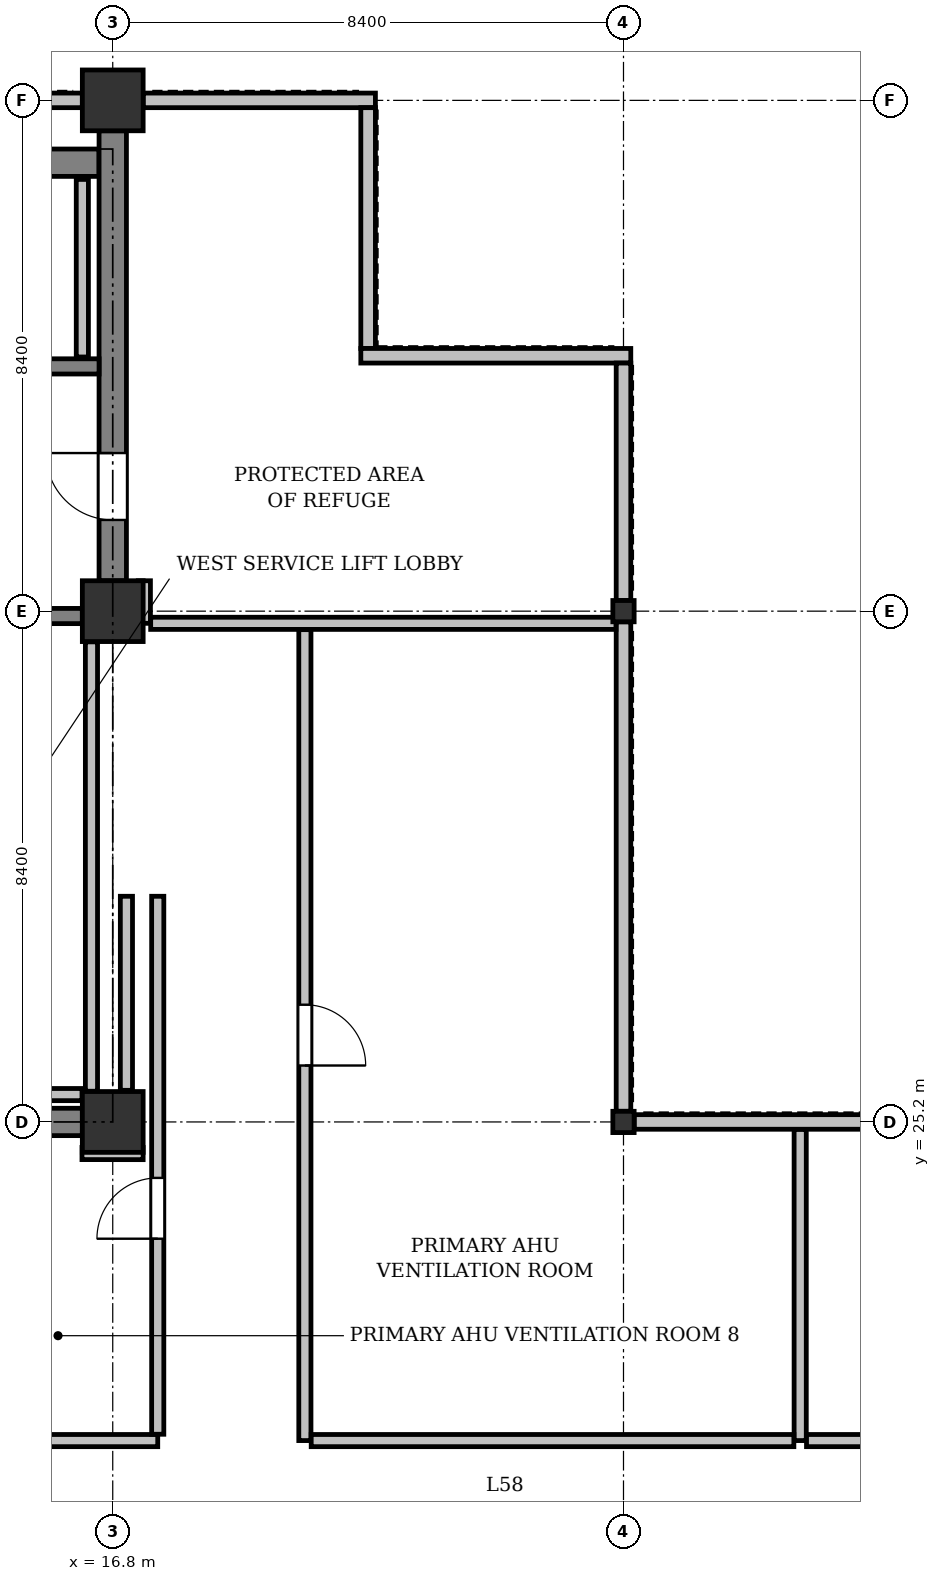
"""IFC4 building model, lengths in metres.
Left out: names, types, materials, properties, quantities, classifications, styles, units other than length and angle.
Written with IfcOpenShell. Run it as: python <this file> out.ifc"""

import sys

from ifc_helpers import new_model, si_unit, direction, frame, frame_2d, origin, origin_2d, place, context, subcontext, project, spatial, rectangle, i_section, extrude, element, fill, save


model = new_model("IFC4")
c1 = context("Model", 3, precision=1e-05, world=origin(), true_north=direction((0.0, 1.0)))
c2 = subcontext(c1, "Body", "Model", "MODEL_VIEW")
j1 = project(units=[si_unit("LENGTHUNIT", "METRE"), si_unit("PLANEANGLEUNIT", "RADIAN")], contexts=[c1])
p1 = place(None, origin())
s1 = spatial("IfcSite", under=j1, at=p1, CompositionType="ELEMENT")
p2 = place(p1, origin())
s2 = spatial("IfcBuilding", under=s1, at=p2, CompositionType="ELEMENT")
p3 = place(p2, frame((0.0, 0.0, 245.2)))
s3 = spatial("IfcBuildingStorey", under=s2, at=p3, CompositionType="ELEMENT", Elevation=245.2)
for number, where, z_axis, x_axis in (
    (1, (16.8, 25.2, 0.0), (0.0, 0.0, 1.0), (1.0, 0.0, 0.0)),
    (2, (16.8, 33.6, 0.0), (0.0, 0.0, 1.0), (1.0, 0.0, 0.0)),
    (3, (16.8, 42.0, 0.0), (0.0, 0.0, 1.0), (1.0, 0.0, 0.0)),
):
    element("IfcColumn", number, at=place(p3, frame(where, z_axis=z_axis, x_axis=x_axis)), inside=s3, PredefinedType="COLUMN", context=c2, shape_type="SweptSolid", body=[
        extrude(rectangle(XDim=1.0, YDim=1.0, at=origin_2d()), origin(), (0.0, 0.0, 1.0), 5.0),
    ])
for number, where, z_axis, x_axis in (
    (4, (25.2, 25.2, 0.0), (0.0, 0.0, 1.0), (1.0, 0.0, 0.0)),
    (5, (25.2, 33.6, 0.0), (0.0, 0.0, 1.0), (1.0, 0.0, 0.0)),
):
    element("IfcColumn", number, at=place(p3, frame(where, z_axis=z_axis, x_axis=x_axis)), inside=s3, PredefinedType="COLUMN", context=c2, shape_type="SweptSolid", body=[
        extrude(i_section(OverallWidth=0.35, OverallDepth=0.35, WebThickness=0.02, FlangeThickness=0.032, at=origin_2d()), origin(), (0.0, 0.0, 1.0), 5.0),
    ])
p4 = place(p3, frame((8.9, 42.0, 0.0), z_axis=(0.0, 0.0, 1.0), x_axis=(1.0, 0.0, 0.0)))
e6 = element("IfcWall", 6, at=p4, inside=s3, PredefinedType="STANDARD", context=c2, shape_type="SweptSolid", body=[
    extrude(rectangle(XDim=7.4, YDim=0.24, at=frame_2d((3.7, 0.0))), origin(), (0.0, 0.0, 1.0), 4.425),
])
p5 = place(p3, frame((17.3, 42.0, 0.0), z_axis=(0.0, 0.0, 1.0), x_axis=(1.0, 0.0, 0.0)))
e7 = element("IfcWall", 7, at=p5, inside=s3, PredefinedType="STANDARD", context=c2, shape_type="SweptSolid", body=[
    extrude(rectangle(XDim=3.82, YDim=0.24, at=frame_2d((1.91, 0.0))), origin(), (0.0, 0.0, 1.0), 4.725),
])
p6 = place(p3, frame((21.0, 41.88, 0.0), z_axis=(0.0, 0.0, 1.0), x_axis=(0.0, -1.0, 0.0)))
e8 = element("IfcWall", 8, at=p6, inside=s3, PredefinedType="STANDARD", context=c2, shape_type="SweptSolid", body=[
    extrude(rectangle(XDim=3.96, YDim=0.24, at=frame_2d((1.98, 0.0))), origin(), (0.0, 0.0, 1.0), 4.725),
])
p7 = place(p3, frame((20.88, 37.8, 0.0), z_axis=(0.0, 0.0, 1.0), x_axis=(1.0, 0.0, 0.0)))
e9 = element("IfcWall", 9, at=p7, inside=s3, PredefinedType="STANDARD", context=c2, shape_type="SweptSolid", body=[
    extrude(rectangle(XDim=4.44, YDim=0.24, at=frame_2d((2.22, 0.0))), origin(), (0.0, 0.0, 1.0), 4.725),
])
p8 = place(p3, frame((25.2, 37.68, 0.0), z_axis=(0.0, 0.0, 1.0), x_axis=(0.0, -1.0, 0.0)))
e10 = element("IfcWall", 10, at=p8, inside=s3, PredefinedType="STANDARD", context=c2, shape_type="SweptSolid", body=[
    extrude(rectangle(XDim=3.905, YDim=0.24, at=frame_2d((1.953, 0.0))), origin(), (0.0, 0.0, 1.0), 4.725),
])
for number, where, z_axis, x_axis in (
    (11, (25.2, 33.425, 0.0), (0.0, 0.0, 1.0), (0.0, -1.0, 0.0)),
    (12, (25.375, 25.2, 0.0), (0.0, 0.0, 1.0), (1.0, 0.0, 0.0)),
):
    element("IfcWall", number, at=place(p3, frame(where, z_axis=z_axis, x_axis=x_axis)), inside=s3, PredefinedType="STANDARD", context=c2, shape_type="SweptSolid", body=[
        extrude(rectangle(XDim=8.05, YDim=0.24, at=frame_2d((4.025, 0.0))), origin(), (0.0, 0.0, 1.0), 4.425),
    ])
p9 = place(p3, frame((8.625, 40.975, 0.0), z_axis=(0.0, 0.0, 1.0), x_axis=(1.0, 0.0, 0.0)))
e13 = element("IfcWall", 13, at=p9, inside=s3, PredefinedType="SHEAR", context=c2, shape_type="SweptSolid", body=[
    extrude(rectangle(XDim=7.95, YDim=0.45, at=frame_2d((3.975, 0.0))), origin(), (0.0, 0.0, 1.0), 4.725),
])
p10 = place(p3, frame((16.8, 34.1, 0.0), z_axis=(0.0, 0.0, 1.0), x_axis=(0.0, 1.0, 0.0)))
e14 = element("IfcWall", 14, at=p10, inside=s3, PredefinedType="SHEAR", context=c2, shape_type="SweptSolid", body=[
    extrude(rectangle(XDim=7.4, YDim=0.45, at=frame_2d((3.7, 0.0))), origin(), (0.0, 0.0, 1.0), 4.725),
])
p11 = place(p10, frame((1.0, 0.0, 0.0)))
e15 = element("IfcOpeningElement", 15, at=p11, cuts=e14, PredefinedType="OPENING", context=c2, shape_type="SweptSolid", body=[
    extrude(rectangle(XDim=1.1, YDim=2.15, at=frame_2d((0.55, 1.075))), frame((0.0, 0.235, 0.0), z_axis=(0.0, -1.0, 0.0), x_axis=(1.0, 0.0, 0.0)), (0.0, 0.0, 1.0), 0.47),
])
p12 = place(p3, frame((8.9, 25.2, 0.0), z_axis=(0.0, 0.0, 1.0), x_axis=(1.0, 0.0, 0.0)))
e16 = element("IfcWall", 16, at=p12, inside=s3, PredefinedType="SHEAR", context=c2, shape_type="SweptSolid", body=[
    extrude(rectangle(XDim=7.4, YDim=0.45, at=frame_2d((3.7, 0.0))), origin(), (0.0, 0.0, 1.0), 4.725),
])
p13 = place(p12, frame((3.8, 0.0, 0.0)))
e17 = element("IfcOpeningElement", 17, at=p13, cuts=e16, PredefinedType="OPENING", context=c2, shape_type="SweptSolid", body=[
    extrude(rectangle(XDim=1.1, YDim=2.15, at=frame_2d((0.55, 1.075))), frame((0.0, 0.235, 0.0), z_axis=(0.0, -1.0, 0.0), x_axis=(1.0, 0.0, 0.0)), (0.0, 0.0, 1.0), 0.47),
])
p14 = place(p3, frame((12.45, 33.52, 0.0), z_axis=(0.0, 0.0, 1.0), x_axis=(1.0, 0.0, 0.0)))
e18 = element("IfcWall", 18, at=p14, inside=s3, PredefinedType="SHEAR", context=c2, shape_type="SweptSolid", body=[
    extrude(rectangle(XDim=3.85, YDim=0.25, at=frame_2d((1.925, 0.0))), origin(), (0.0, 0.0, 1.0), 4.725),
])
p15 = place(p14, frame((0.32, 0.0, 0.0)))
e19 = element("IfcOpeningElement", 19, at=p15, cuts=e18, PredefinedType="OPENING", context=c2, shape_type="SweptSolid", body=[
    extrude(rectangle(XDim=1.0, YDim=2.15, at=frame_2d((0.5, 1.075))), frame((0.0, 0.135, 0.0), z_axis=(0.0, -1.0, 0.0), x_axis=(1.0, 0.0, 0.0)), (0.0, 0.0, 1.0), 0.27),
])
p16 = place(p3, frame((12.45, 37.625, 0.0), z_axis=(0.0, 0.0, 1.0), x_axis=(1.0, 0.0, 0.0)))
e20 = element("IfcWall", 20, at=p16, inside=s3, PredefinedType="SHEAR", context=c2, shape_type="SweptSolid", body=[
    extrude(rectangle(XDim=4.125, YDim=0.25, at=frame_2d((2.062, 0.0))), origin(), (0.0, 0.0, 1.0), 4.725),
])
p17 = place(p16, frame((1.637, 0.0, 0.0)))
e21 = element("IfcOpeningElement", 21, at=p17, cuts=e20, PredefinedType="OPENING", context=c2, shape_type="SweptSolid", body=[
    extrude(rectangle(XDim=0.85, YDim=2.15, at=frame_2d((0.425, 1.075))), frame((0.0, 0.135, 0.0), z_axis=(0.0, -1.0, 0.0), x_axis=(1.0, 0.0, 0.0)), (0.0, 0.0, 1.0), 0.27),
])
p18 = place(p3, frame((16.45, 25.705, 0.0), z_axis=(0.0, 0.0, 1.0), x_axis=(0.0, 1.0, 0.0)))
e22 = element("IfcWall", 22, at=p18, inside=s3, PredefinedType="PARTITIONING", context=c2, shape_type="SweptSolid", body=[
    extrude(rectangle(XDim=7.39, YDim=0.2, at=frame_2d((3.695, 0.0))), origin(), (0.0, 0.0, 1.0), 4.725),
])
p19 = place(p3, frame((14.354, 25.65, 0.0), z_axis=(0.0, 0.0, 1.0), x_axis=(1.0, 0.0, 0.0)))
e23 = element("IfcWall", 23, at=p19, inside=s3, PredefinedType="PARTITIONING", context=c2, shape_type="SweptSolid", body=[
    extrude(rectangle(XDim=1.941, YDim=0.2, at=frame_2d((0.97, 0.0))), origin(), (0.0, 0.0, 1.0), 4.725),
])
p20 = place(p3, frame((16.3, 37.78, 0.0), z_axis=(0.0, 0.0, 1.0), x_axis=(0.0, 1.0, 0.0)))
e24 = element("IfcWall", 24, at=p20, inside=s3, PredefinedType="PARTITIONING", context=c2, shape_type="SweptSolid", body=[
    extrude(rectangle(XDim=2.92, YDim=0.2, at=frame_2d((1.46, 0.0))), origin(), (0.0, 0.0, 1.0), 3.775),
])
p21 = place(p3, frame((17.32, 34.1, 0.0), z_axis=(0.0, 0.0, 1.0), x_axis=(0.0, -1.0, 0.0)))
e25 = element("IfcWall", 25, at=p21, inside=s3, PredefinedType="PARTITIONING", context=c2, shape_type="SweptSolid", body=[
    extrude(rectangle(XDim=0.7, YDim=0.2, at=frame_2d((0.35, 0.0))), origin(), (0.0, 0.0, 1.0), 3.825),
])
p22 = place(p3, frame((17.424, 33.4, 0.0), z_axis=(0.0, 0.0, 1.0), x_axis=(1.0, 0.0, 0.0)))
e26 = element("IfcWall", 26, at=p22, inside=s3, PredefinedType="PARTITIONING", context=c2, shape_type="SweptSolid", body=[
    extrude(rectangle(XDim=7.652, YDim=0.2, at=frame_2d((3.826, 0.0))), origin(), (0.0, 0.0, 1.0), 3.825),
])
p23 = place(p3, frame((28.106, 25.076, 0.0), z_axis=(0.0, 0.0, 1.0), x_axis=(0.0, -1.0, 0.0)))
e27 = element("IfcWall", 27, at=p23, inside=s3, PredefinedType="PARTITIONING", context=c2, shape_type="SweptSolid", body=[
    extrude(rectangle(XDim=5.116, YDim=0.2, at=frame_2d((2.558, 0.0))), origin(), (0.0, 0.0, 1.0), 4.725),
])
p24 = place(p3, frame((28.21, 19.96, 0.0), z_axis=(0.0, 0.0, 1.0), x_axis=(1.0, 0.0, 0.0)))
e28 = element("IfcWall", 28, at=p24, inside=s3, PredefinedType="PARTITIONING", context=c2, shape_type="SweptSolid", body=[
    extrude(rectangle(XDim=7.39, YDim=0.2, at=frame_2d((3.695, 0.0))), origin(), (0.0, 0.0, 1.0), 3.709),
])
p25 = place(p3, frame((19.96, 33.296, 0.0), z_axis=(0.0, 0.0, 1.0), x_axis=(0.0, -1.0, 0.0)))
e29 = element("IfcWall", 29, at=p25, inside=s3, PredefinedType="PARTITIONING", context=c2, shape_type="SweptSolid", body=[
    extrude(rectangle(XDim=13.336, YDim=0.2, at=frame_2d((6.668, 0.0))), origin(), (0.0, 0.0, 1.0), 3.825),
])
p26 = place(p25, frame((6.168, 0.0, 0.0)))
e30 = element("IfcOpeningElement", 30, at=p26, cuts=e29, PredefinedType="OPENING", context=c2, shape_type="SweptSolid", body=[
    extrude(rectangle(XDim=1.0, YDim=2.15, at=frame_2d((0.5, 1.075))), frame((0.0, 0.11, 0.0), z_axis=(0.0, -1.0, 0.0), x_axis=(1.0, 0.0, 0.0)), (0.0, 0.0, 1.0), 0.22),
])
p27 = place(p3, frame((20.064, 19.96, 0.0), z_axis=(0.0, 0.0, 1.0), x_axis=(1.0, 0.0, 0.0)))
e31 = element("IfcWall", 31, at=p27, inside=s3, PredefinedType="PARTITIONING", context=c2, shape_type="SweptSolid", body=[
    extrude(rectangle(XDim=7.938, YDim=0.2, at=frame_2d((3.969, 0.0))), origin(), (0.0, 0.0, 1.0), 3.709),
])
p28 = place(p3, frame((14.26, 19.96, 0.0), z_axis=(0.0, 0.0, 1.0), x_axis=(1.0, 0.0, 0.0)))
e32 = element("IfcWall", 32, at=p28, inside=s3, PredefinedType="PARTITIONING", context=c2, shape_type="SweptSolid", body=[
    extrude(rectangle(XDim=3.28, YDim=0.2, at=frame_2d((1.64, 0.0))), origin(), (0.0, 0.0, 1.0), 3.709),
])
p29 = place(p3, frame((17.54, 20.064, 0.0), z_axis=(0.0, 0.0, 1.0), x_axis=(0.0, 1.0, 0.0)))
e33 = element("IfcWall", 33, at=p29, inside=s3, PredefinedType="PARTITIONING", context=c2, shape_type="SweptSolid", body=[
    extrude(rectangle(XDim=8.847, YDim=0.2, at=frame_2d((4.424, 0.0))), origin(), (0.0, 0.0, 1.0), 3.825),
])
p30 = place(p29, frame((3.216, 0.0, 0.0)))
e34 = element("IfcOpeningElement", 34, at=p30, cuts=e33, PredefinedType="OPENING", context=c2, shape_type="SweptSolid", body=[
    extrude(rectangle(XDim=1.0, YDim=2.15, at=frame_2d((0.5, 1.075))), frame((0.0, 0.11, 0.0), z_axis=(0.0, -1.0, 0.0), x_axis=(1.0, 0.0, 0.0)), (0.0, 0.0, 1.0), 0.22),
])
p31 = place(p3, frame((17.025, 28.911, 0.0), z_axis=(0.0, 0.0, 1.0), x_axis=(0.0, -1.0, 0.0)))
e35 = element("IfcWall", 35, at=p31, inside=s3, PredefinedType="PARTITIONING", context=c2, shape_type="SweptSolid", body=[
    extrude(rectangle(XDim=3.191, YDim=0.2, at=frame_2d((1.596, 0.0))), origin(), (0.0, 0.0, 1.0), 3.709),
])
p32 = place(p3, frame((17.3, 24.68, 0.0), z_axis=(0.0, 0.0, 1.0), x_axis=(-0.999999528702, 0.000970873329, 0.0)))
e36 = element("IfcWall", 36, at=p32, inside=s3, PredefinedType="PARTITIONING", context=c2, shape_type="SweptSolid", body=[
    extrude(rectangle(XDim=1.006, YDim=0.2, at=frame_2d((0.503, 0.0))), origin(), (0.0, 0.0, 1.0), 3.709),
])
p33 = place(p11, origin())
e37 = element("IfcDoor", 37, at=p33, inside=s3, OperationType="SINGLE_SWING_RIGHT", PredefinedType="DOOR", context=c2, shape_type="SweptSolid", body=[
    extrude(rectangle(XDim=1.1, YDim=2.15, at=frame_2d((0.55, 1.075))), frame((0.0, 0.025, 0.0), z_axis=(0.0, -1.0, 0.0), x_axis=(1.0, 0.0, 0.0)), (0.0, 0.0, 1.0), 0.05),
])
fill(e15, e37)
p34 = place(p26, origin())
e38 = element("IfcDoor", 38, at=p34, inside=s3, OperationType="SINGLE_SWING_RIGHT", PredefinedType="DOOR", context=c2, shape_type="SweptSolid", body=[
    extrude(rectangle(XDim=1.0, YDim=2.15, at=frame_2d((0.5, 1.075))), frame((0.0, 0.025, 0.0), z_axis=(0.0, -1.0, 0.0), x_axis=(1.0, 0.0, 0.0)), (0.0, 0.0, 1.0), 0.05),
])
fill(e30, e38)
p35 = place(p30, origin())
e39 = element("IfcDoor", 39, at=p35, inside=s3, OperationType="SINGLE_SWING_LEFT", PredefinedType="DOOR", context=c2, shape_type="SweptSolid", body=[
    extrude(rectangle(XDim=1.0, YDim=2.15, at=frame_2d((0.5, 1.075))), frame((0.0, 0.025, 0.0), z_axis=(0.0, -1.0, 0.0), x_axis=(1.0, 0.0, 0.0)), (0.0, 0.0, 1.0), 0.05),
])
fill(e34, e39)
save(model, sys.argv[1])
